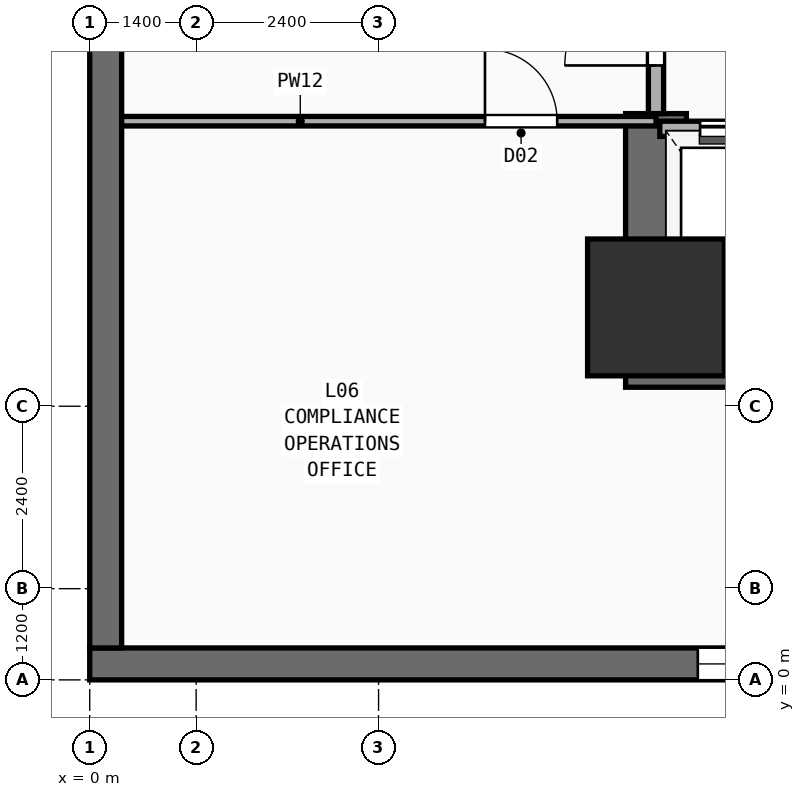
"""IFC4 building model, lengths in metres.
Left out: names, types, materials, properties, quantities, classifications, styles, units other than length and angle.
Written with IfcOpenShell. Run it as: python <this file> out.ifc"""

import sys

from ifc_helpers import new_model, si_unit, direction, frame, frame_2d, origin, origin_2d, place, context, subcontext, project, spatial, rectangle, extrude, element, fill, save


model = new_model("IFC4")
c1 = context("Model", 3, precision=1e-05, world=origin(), true_north=direction((0.0, 1.0)))
c2 = subcontext(c1, "Body", "Model", "MODEL_VIEW")
j1 = project(units=[si_unit("LENGTHUNIT", "METRE"), si_unit("PLANEANGLEUNIT", "RADIAN")], contexts=[c1])
p1 = place(None, origin())
s1 = spatial("IfcSite", under=j1, at=p1, CompositionType="ELEMENT")
p2 = place(p1, origin())
s2 = spatial("IfcBuilding", under=s1, at=p2, CompositionType="ELEMENT")
p3 = place(p2, frame((0.0, 0.0, 24.8)))
s3 = spatial("IfcBuildingStorey", under=s2, at=p3, CompositionType="ELEMENT", Elevation=24.8)
p4 = place(p3, frame((7.05, 4.25, 0.0), z_axis=(0.0, 0.0, 1.0), x_axis=(1.0, 0.0, 0.0)))
e1 = element("IfcWall", 1, at=p4, inside=s3, PredefinedType="SHEAR", context=c2, shape_type="SweptSolid", body=[
    extrude(rectangle(XDim=14.15, YDim=0.8, at=frame_2d((7.075, 0.0))), origin(), (0.0, 0.0, 1.0), 4.35),
])
p5 = place(p3, frame((7.45, 4.65, 0.0), z_axis=(0.0, 0.0, 1.0), x_axis=(0.0, 1.0, 0.0)))
e2 = element("IfcWall", 2, at=p5, inside=s3, PredefinedType="SHEAR", context=c2, shape_type="SweptSolid", body=[
    extrude(rectangle(XDim=2.8, YDim=0.8, at=frame_2d((1.4, 0.0))), origin(), (0.0, 0.0, 1.0), 4.35),
])
p6 = place(p3, frame((7.45, 4.9, 0.0), z_axis=(0.0, 0.0, 1.0), x_axis=(1.0, 0.0, 0.0)))
e3 = element("IfcColumn", 3, at=p6, inside=s3, PredefinedType="COLUMN", context=c2, shape_type="SweptSolid", body=[
    extrude(rectangle(XDim=1.8, YDim=1.8, at=origin_2d()), origin(), (0.0, 0.0, 1.0), 4.35),
])
p7 = place(p3, frame((0.0, 0.21, 0.0), z_axis=(0.0, 0.0, 1.0), x_axis=(1.0, 0.0, 0.0)))
e4 = element("IfcWall", 4, at=p7, inside=s3, PredefinedType="SOLIDWALL", context=c2, shape_type="SweptSolid", body=[
    extrude(rectangle(XDim=64.8, YDim=0.42, at=frame_2d((32.4, 0.0))), origin(), (0.0, 0.0, 1.0), 4.35),
])
p8 = place(p7, frame((8.0, 0.0, 0.95)))
e5 = element("IfcOpeningElement", 5, at=p8, cuts=e4, PredefinedType="OPENING", context=c2, shape_type="SweptSolid", body=[
    extrude(rectangle(XDim=1.2, YDim=1.6, at=frame_2d((0.6, 0.8))), frame((0.0, 0.22, 0.0), z_axis=(0.0, -1.0, 0.0), x_axis=(1.0, 0.0, 0.0)), (0.0, 0.0, 1.0), 0.44),
])
p9 = place(p7, frame((16.0, 0.0, 0.95)))
e6 = element("IfcOpeningElement", 6, at=p9, cuts=e4, PredefinedType="OPENING", context=c2, shape_type="SweptSolid", body=[
    extrude(rectangle(XDim=1.2, YDim=1.6, at=frame_2d((0.6, 0.8))), frame((0.0, 0.22, 0.0), z_axis=(0.0, -1.0, 0.0), x_axis=(1.0, 0.0, 0.0)), (0.0, 0.0, 1.0), 0.44),
])
p10 = place(p7, frame((24.0, 0.0, 0.95)))
e7 = element("IfcOpeningElement", 7, at=p10, cuts=e4, PredefinedType="OPENING", context=c2, shape_type="SweptSolid", body=[
    extrude(rectangle(XDim=1.2, YDim=1.6, at=frame_2d((0.6, 0.8))), frame((0.0, 0.22, 0.0), z_axis=(0.0, -1.0, 0.0), x_axis=(1.0, 0.0, 0.0)), (0.0, 0.0, 1.0), 0.44),
])
p11 = place(p7, frame((34.0, 0.0, 0.95)))
e8 = element("IfcOpeningElement", 8, at=p11, cuts=e4, PredefinedType="OPENING", context=c2, shape_type="SweptSolid", body=[
    extrude(rectangle(XDim=1.2, YDim=1.6, at=frame_2d((0.6, 0.8))), frame((0.0, 0.22, 0.0), z_axis=(0.0, -1.0, 0.0), x_axis=(1.0, 0.0, 0.0)), (0.0, 0.0, 1.0), 0.44),
])
p12 = place(p7, frame((44.5, 0.0, 0.95)))
e9 = element("IfcOpeningElement", 9, at=p12, cuts=e4, PredefinedType="OPENING", context=c2, shape_type="SweptSolid", body=[
    extrude(rectangle(XDim=1.2, YDim=1.6, at=frame_2d((0.6, 0.8))), frame((0.0, 0.22, 0.0), z_axis=(0.0, -1.0, 0.0), x_axis=(1.0, 0.0, 0.0)), (0.0, 0.0, 1.0), 0.44),
])
p13 = place(p7, frame((58.0, 0.0, 0.95)))
e10 = element("IfcOpeningElement", 10, at=p13, cuts=e4, PredefinedType="OPENING", context=c2, shape_type="SweptSolid", body=[
    extrude(rectangle(XDim=1.2, YDim=1.6, at=frame_2d((0.6, 0.8))), frame((0.0, 0.22, 0.0), z_axis=(0.0, -1.0, 0.0), x_axis=(1.0, 0.0, 0.0)), (0.0, 0.0, 1.0), 0.44),
])
p14 = place(p3, frame((0.21, 0.42, 0.0), z_axis=(0.0, 0.0, 1.0), x_axis=(0.0, 1.0, 0.0)))
e11 = element("IfcWall", 11, at=p14, inside=s3, PredefinedType="SOLIDWALL", context=c2, shape_type="SweptSolid", body=[
    extrude(rectangle(XDim=50.78, YDim=0.42, at=frame_2d((25.39, 0.0))), origin(), (0.0, 0.0, 1.0), 4.35),
])
p15 = place(p14, frame((8.0, 0.0, 0.95)))
e12 = element("IfcOpeningElement", 12, at=p15, cuts=e11, PredefinedType="OPENING", context=c2, shape_type="SweptSolid", body=[
    extrude(rectangle(XDim=1.2, YDim=1.6, at=frame_2d((0.6, 0.8))), frame((0.0, 0.22, 0.0), z_axis=(0.0, -1.0, 0.0), x_axis=(1.0, 0.0, 0.0)), (0.0, 0.0, 1.0), 0.44),
])
p16 = place(p14, frame((18.0, 0.0, 0.95)))
e13 = element("IfcOpeningElement", 13, at=p16, cuts=e11, PredefinedType="OPENING", context=c2, shape_type="SweptSolid", body=[
    extrude(rectangle(XDim=1.2, YDim=1.6, at=frame_2d((0.6, 0.8))), frame((0.0, 0.22, 0.0), z_axis=(0.0, -1.0, 0.0), x_axis=(1.0, 0.0, 0.0)), (0.0, 0.0, 1.0), 0.44),
])
p17 = place(p14, frame((27.5, 0.0, 0.95)))
e14 = element("IfcOpeningElement", 14, at=p17, cuts=e11, PredefinedType="OPENING", context=c2, shape_type="SweptSolid", body=[
    extrude(rectangle(XDim=1.2, YDim=1.6, at=frame_2d((0.6, 0.8))), frame((0.0, 0.22, 0.0), z_axis=(0.0, -1.0, 0.0), x_axis=(1.0, 0.0, 0.0)), (0.0, 0.0, 1.0), 0.44),
])
p18 = place(p14, frame((45.0, 0.0, 0.95)))
e15 = element("IfcOpeningElement", 15, at=p18, cuts=e11, PredefinedType="OPENING", context=c2, shape_type="SweptSolid", body=[
    extrude(rectangle(XDim=1.2, YDim=1.6, at=frame_2d((0.6, 0.8))), frame((0.0, 0.22, 0.0), z_axis=(0.0, -1.0, 0.0), x_axis=(1.0, 0.0, 0.0)), (0.0, 0.0, 1.0), 0.44),
])
p19 = place(p3, frame((7.5, 7.25, 0.0), z_axis=(0.0, 0.0, 1.0), x_axis=(1.0, 0.0, 0.0)))
e16 = element("IfcWall", 16, at=p19, inside=s3, PredefinedType="PARTITIONING", context=c2, shape_type="SweptSolid", body=[
    extrude(rectangle(XDim=8.35, YDim=0.2, at=frame_2d((4.175, 0.0))), origin(), (0.0, 0.0, 1.0), 4.35),
])
p20 = place(p19, frame((0.53, 0.0, 0.0)))
e17 = element("IfcOpeningElement", 17, at=p20, cuts=e16, PredefinedType="OPENING", context=c2, shape_type="SweptSolid", body=[
    extrude(rectangle(XDim=1.1, YDim=2.2, at=frame_2d((0.55, 1.1))), frame((0.0, 0.11, 0.0), z_axis=(0.0, -1.0, 0.0), x_axis=(1.0, 0.0, 0.0)), (0.0, 0.0, 1.0), 0.22),
])
p21 = place(p19, frame((2.37, 0.0, 0.0)))
e18 = element("IfcOpeningElement", 18, at=p21, cuts=e16, PredefinedType="OPENING", context=c2, shape_type="SweptSolid", body=[
    extrude(rectangle(XDim=1.1, YDim=2.2, at=frame_2d((0.55, 1.1))), frame((0.0, 0.11, 0.0), z_axis=(0.0, -1.0, 0.0), x_axis=(1.0, 0.0, 0.0)), (0.0, 0.0, 1.0), 0.22),
])
p22 = place(p19, frame((4.33, 0.0, 0.0)))
e19 = element("IfcOpeningElement", 19, at=p22, cuts=e16, PredefinedType="OPENING", context=c2, shape_type="SweptSolid", body=[
    extrude(rectangle(XDim=1.1, YDim=2.2, at=frame_2d((0.55, 1.1))), frame((0.0, 0.11, 0.0), z_axis=(0.0, -1.0, 0.0), x_axis=(1.0, 0.0, 0.0)), (0.0, 0.0, 1.0), 0.22),
])
p23 = place(p19, frame((6.5, 0.0, 0.0)))
e20 = element("IfcOpeningElement", 20, at=p23, cuts=e16, PredefinedType="OPENING", context=c2, shape_type="SweptSolid", body=[
    extrude(rectangle(XDim=1.1, YDim=2.2, at=frame_2d((0.55, 1.1))), frame((0.0, 0.11, 0.0), z_axis=(0.0, -1.0, 0.0), x_axis=(1.0, 0.0, 0.0)), (0.0, 0.0, 1.0), 0.22),
])
p24 = place(p3, frame((7.45, 7.45, 0.0), z_axis=(0.0, 0.0, 1.0), x_axis=(0.0, 1.0, 0.0)))
e21 = element("IfcWall", 21, at=p24, inside=s3, PredefinedType="PARTITIONING", context=c2, shape_type="SweptSolid", body=[
    extrude(rectangle(XDim=2.3, YDim=0.2, at=frame_2d((1.15, 0.0))), origin(), (0.0, 0.0, 1.0), 3.13),
])
p25 = place(p24, frame((0.633, 0.0, 0.0)))
e22 = element("IfcOpeningElement", 22, at=p25, cuts=e21, PredefinedType="OPENING", context=c2, shape_type="SweptSolid", body=[
    extrude(rectangle(XDim=1.2, YDim=2.25, at=frame_2d((0.6, 1.125))), frame((0.0, 0.11, 0.0), z_axis=(0.0, -1.0, 0.0), x_axis=(1.0, 0.0, 0.0)), (0.0, 0.0, 1.0), 0.22),
])
p26 = place(p3, frame((0.42, 7.35, 0.0), z_axis=(0.0, 0.0, 1.0), x_axis=(1.0, 0.0, 0.0)))
e23 = element("IfcWall", 23, at=p26, inside=s3, PredefinedType="PARTITIONING", context=c2, shape_type="SweptSolid", body=[
    extrude(rectangle(XDim=7.03, YDim=0.125, at=frame_2d((3.515, 0.0))), origin(), (0.0, 0.0, 1.0), 4.35),
])
p27 = place(p26, frame((4.78, 0.0, 0.0)))
e24 = element("IfcOpeningElement", 24, at=p27, cuts=e23, PredefinedType="OPENING", context=c2, shape_type="SweptSolid", body=[
    extrude(rectangle(XDim=0.95, YDim=2.15, at=frame_2d((0.475, 1.075))), frame((0.0, 0.073, 0.0), z_axis=(0.0, -1.0, 0.0), x_axis=(1.0, 0.0, 0.0)), (0.0, 0.0, 1.0), 0.145),
])
p28 = place(p8, origin())
e25 = element("IfcWindow", 25, at=p28, inside=s3, PartitioningType="SINGLE_PANEL", PredefinedType="WINDOW", context=c2, shape_type="SweptSolid", body=[
    extrude(rectangle(XDim=1.2, YDim=1.6, at=frame_2d((0.6, 0.8))), frame((0.0, 0.03, 0.0), z_axis=(0.0, -1.0, 0.0), x_axis=(1.0, 0.0, 0.0)), (0.0, 0.0, 1.0), 0.06),
])
fill(e5, e25)
p29 = place(p20, origin())
e26 = element("IfcDoor", 26, at=p29, inside=s3, OperationType="SLIDING_TO_LEFT", PredefinedType="DOOR", context=c2, shape_type="SweptSolid", body=[
    extrude(rectangle(XDim=1.1, YDim=2.2, at=frame_2d((0.55, 1.1))), frame((0.0, 0.025, 0.0), z_axis=(0.0, -1.0, 0.0), x_axis=(1.0, 0.0, 0.0)), (0.0, 0.0, 1.0), 0.05),
])
fill(e17, e26)
p30 = place(p25, frame((1.2, 0.0, 0.0), z_axis=(0.0, 0.0, 1.0), x_axis=(-1.0, 0.0, 0.0)))
e27 = element("IfcDoor", 27, at=p30, inside=s3, OperationType="SINGLE_SWING_RIGHT", PredefinedType="DOOR", context=c2, shape_type="SweptSolid", body=[
    extrude(rectangle(XDim=1.2, YDim=2.25, at=frame_2d((0.6, 1.125))), frame((0.0, 0.025, 0.0), z_axis=(0.0, -1.0, 0.0), x_axis=(1.0, 0.0, 0.0)), (0.0, 0.0, 1.0), 0.05),
])
fill(e22, e27)
p31 = place(p27, origin())
e28 = element("IfcDoor", 28, at=p31, inside=s3, OperationType="SINGLE_SWING_LEFT", PredefinedType="DOOR", context=c2, shape_type="SweptSolid", body=[
    extrude(rectangle(XDim=0.95, YDim=2.15, at=frame_2d((0.475, 1.075))), frame((0.0, 0.025, 0.0), z_axis=(0.0, -1.0, 0.0), x_axis=(1.0, 0.0, 0.0)), (0.0, 0.0, 1.0), 0.05),
])
fill(e24, e28)
save(model, sys.argv[1])
